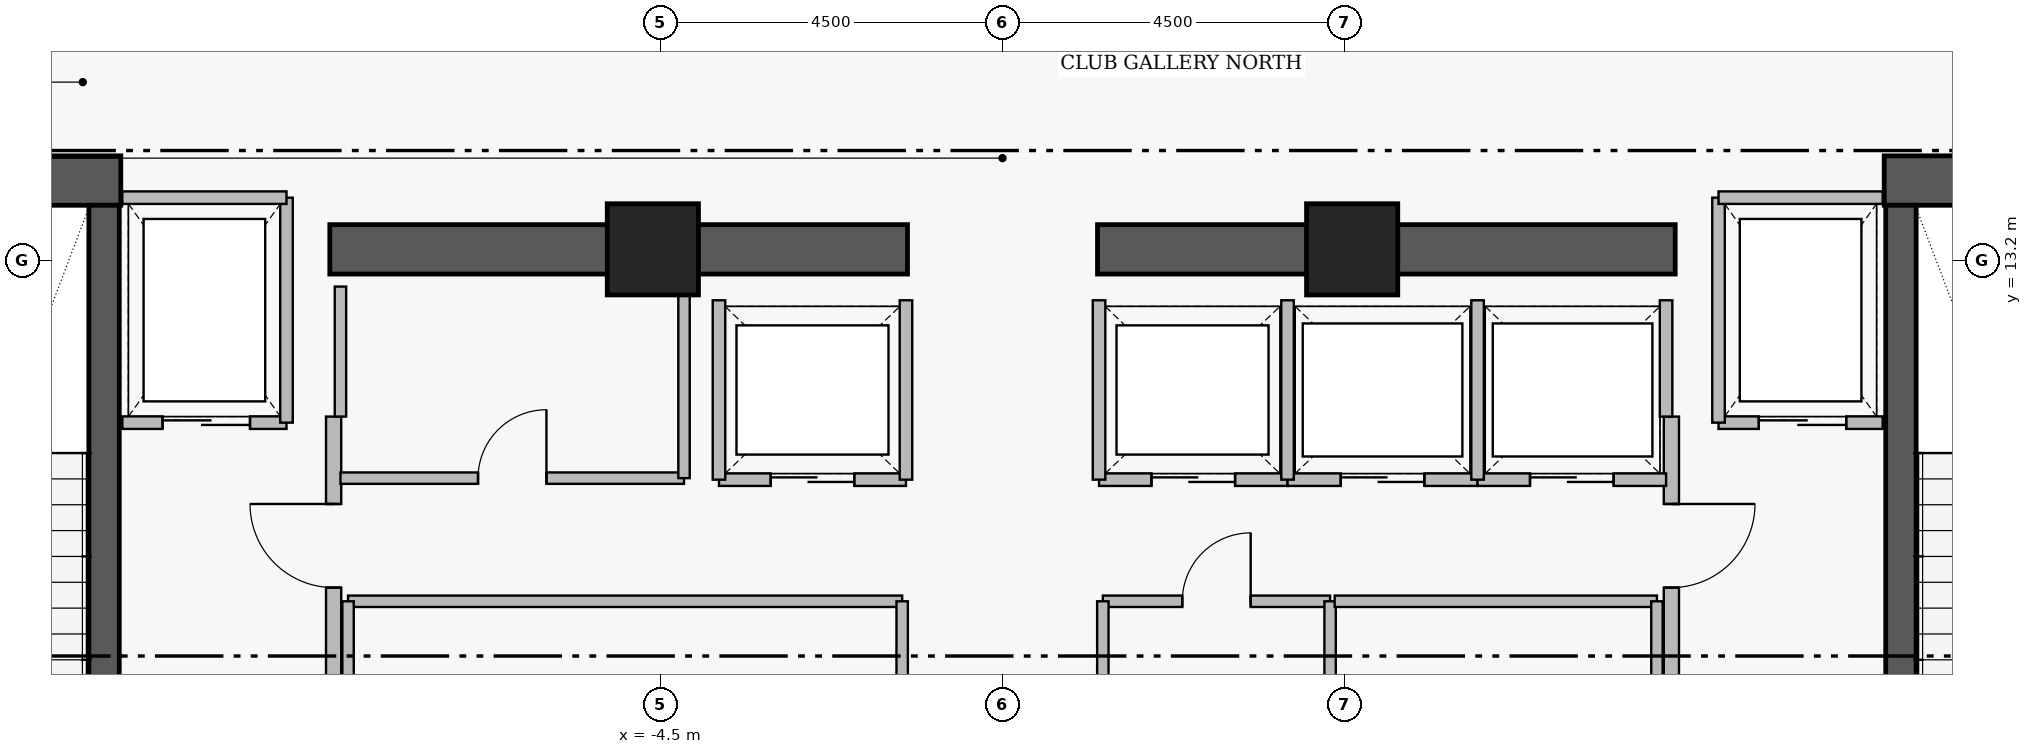
"""IFC4 building model, lengths in metres.
Left out: names, types, materials, properties, quantities, classifications, styles, units other than length and angle.
Written with IfcOpenShell. Run it as: python <this file> out.ifc"""

import sys

from ifc_helpers import new_model, si_unit, direction, frame, frame_2d, origin, origin_2d, place, context, subcontext, project, spatial, rectangle, extrude, element, fill, save


model = new_model("IFC4")
c1 = context("Model", 3, precision=1e-05, world=origin(), true_north=direction((0.0, 1.0)))
c2 = subcontext(c1, "Body", "Model", "MODEL_VIEW")
j1 = project(units=[si_unit("LENGTHUNIT", "METRE"), si_unit("PLANEANGLEUNIT", "RADIAN")], contexts=[c1])
p1 = place(None, origin())
s1 = spatial("IfcSite", under=j1, at=p1, CompositionType="ELEMENT")
p2 = place(p1, origin())
s2 = spatial("IfcBuilding", under=s1, at=p2, CompositionType="ELEMENT")
p3 = place(p2, frame((0.0, 0.0, 168.2)))
s3 = spatial("IfcBuildingStorey", under=s2, at=p3, CompositionType="ELEMENT", Elevation=168.2)
for number, where, z_axis, x_axis in (
    (1, (-16.06, 14.255, 0.0), (0.0, 0.0, 1.0), (1.0, 0.0, 0.0)),
    (2, (11.6, 14.255, 0.0), (0.0, 0.0, 1.0), (1.0, 0.0, 0.0)),
):
    element("IfcWall", number, at=place(p3, frame(where, z_axis=z_axis, x_axis=x_axis)), inside=s3, PredefinedType="SHEAR", context=c2, shape_type="SweptSolid", body=[
        extrude(rectangle(XDim=4.46, YDim=0.65, at=frame_2d((2.23, 0.0))), origin(), (0.0, 0.0, 1.0), 4.41),
    ])
for number, where, z_axis, x_axis in (
    (3, (-8.85, 13.35, 0.0), (0.0, 0.0, 1.0), (1.0, 0.0, 0.0)),
    (4, (1.25, 13.35, 0.0), (0.0, 0.0, 1.0), (1.0, 0.0, 0.0)),
):
    element("IfcWall", number, at=place(p3, frame(where, z_axis=z_axis, x_axis=x_axis)), inside=s3, PredefinedType="SHEAR", context=c2, shape_type="SweptSolid", body=[
        extrude(rectangle(XDim=7.6, YDim=0.65, at=frame_2d((3.8, 0.0))), origin(), (0.0, 0.0, 1.0), 4.38),
    ])
p4 = place(p3, frame((-11.82, 4.97, 0.0), z_axis=(0.0, 0.0, 1.0), x_axis=(0.0, 1.0, 0.0)))
e5 = element("IfcWall", 5, at=p4, inside=s3, PredefinedType="SHEAR", context=c2, shape_type="SweptSolid", body=[
    extrude(rectangle(XDim=8.96, YDim=0.4, at=frame_2d((4.48, 0.0))), origin(), (0.0, 0.0, 1.0), 4.41),
])
p5 = place(p4, frame((0.31, 0.0, 0.0)))
e6 = element("IfcOpeningElement", 6, at=p5, cuts=e5, PredefinedType="OPENING", context=c2, shape_type="SweptSolid", body=[
    extrude(rectangle(XDim=1.12, YDim=2.22, at=frame_2d((0.56, 1.11))), frame((0.0, 0.21, 0.0), z_axis=(0.0, -1.0, 0.0), x_axis=(1.0, 0.0, 0.0)), (0.0, 0.0, 1.0), 0.42),
])
p6 = place(p3, frame((11.82, 13.93, 0.0), z_axis=(0.0, 0.0, 1.0), x_axis=(0.0, -1.0, 0.0)))
e7 = element("IfcWall", 7, at=p6, inside=s3, PredefinedType="SHEAR", context=c2, shape_type="SweptSolid", body=[
    extrude(rectangle(XDim=8.96, YDim=0.4, at=frame_2d((4.48, 0.0))), origin(), (0.0, 0.0, 1.0), 4.41),
])
p7 = place(p6, frame((7.53, 0.0, 0.0)))
e8 = element("IfcOpeningElement", 8, at=p7, cuts=e7, PredefinedType="OPENING", context=c2, shape_type="SweptSolid", body=[
    extrude(rectangle(XDim=1.12, YDim=2.22, at=frame_2d((0.56, 1.11))), frame((0.0, 0.21, 0.0), z_axis=(0.0, -1.0, 0.0), x_axis=(1.0, 0.0, 0.0)), (0.0, 0.0, 1.0), 0.42),
])
for number, where, z_axis, x_axis in (
    (9, (-4.6, 13.35, 0.0), (0.0, 0.0, 1.0), (1.0, 0.0, 0.0)),
    (10, (4.6, 13.35, 0.0), (0.0, 0.0, 1.0), (1.0, 0.0, 0.0)),
):
    element("IfcColumn", number, at=place(p3, frame(where, z_axis=z_axis, x_axis=x_axis)), inside=s3, PredefinedType="COLUMN", context=c2, shape_type="SweptSolid", body=[
        extrude(rectangle(XDim=1.2, YDim=1.2, at=origin_2d()), origin(), (0.0, 0.0, 1.0), 4.6),
    ])
p8 = place(p3, frame((-8.8, 5.05, 0.0), z_axis=(0.0, 0.0, 1.0), x_axis=(0.0, 1.0, 0.0)))
e11 = element("IfcWall", 11, at=p8, inside=s3, PredefinedType="PARTITIONING", context=c2, shape_type="SweptSolid", body=[
    extrude(rectangle(XDim=6.1, YDim=0.2, at=frame_2d((3.05, 0.0))), origin(), (0.0, 0.0, 1.0), 4.38),
])
p9 = place(p8, frame((0.25, 0.0, 0.0)))
e12 = element("IfcOpeningElement", 12, at=p9, cuts=e11, PredefinedType="OPENING", context=c2, shape_type="SweptSolid", body=[
    extrude(rectangle(XDim=1.1, YDim=2.2, at=frame_2d((0.55, 1.1))), frame((0.0, 0.11, 0.0), z_axis=(0.0, -1.0, 0.0), x_axis=(1.0, 0.0, 0.0)), (0.0, 0.0, 1.0), 0.22),
])
p10 = place(p8, frame((3.85, 0.0, 0.0)))
e13 = element("IfcOpeningElement", 13, at=p10, cuts=e11, PredefinedType="OPENING", context=c2, shape_type="SweptSolid", body=[
    extrude(rectangle(XDim=1.1, YDim=2.2, at=frame_2d((0.55, 1.1))), frame((0.0, 0.11, 0.0), z_axis=(0.0, -1.0, 0.0), x_axis=(1.0, 0.0, 0.0)), (0.0, 0.0, 1.0), 0.22),
])
p11 = place(p3, frame((8.8, 11.15, 0.0), z_axis=(0.0, 0.0, 1.0), x_axis=(0.0, -1.0, 0.0)))
e14 = element("IfcWall", 14, at=p11, inside=s3, PredefinedType="PARTITIONING", context=c2, shape_type="SweptSolid", body=[
    extrude(rectangle(XDim=6.1, YDim=0.2, at=frame_2d((3.05, 0.0))), origin(), (0.0, 0.0, 1.0), 4.38),
])
p12 = place(p11, frame((1.15, 0.0, 0.0)))
e15 = element("IfcOpeningElement", 15, at=p12, cuts=e14, PredefinedType="OPENING", context=c2, shape_type="SweptSolid", body=[
    extrude(rectangle(XDim=1.1, YDim=2.2, at=frame_2d((0.55, 1.1))), frame((0.0, 0.11, 0.0), z_axis=(0.0, -1.0, 0.0), x_axis=(1.0, 0.0, 0.0)), (0.0, 0.0, 1.0), 0.22),
])
p13 = place(p11, frame((4.75, 0.0, 0.0)))
e16 = element("IfcOpeningElement", 16, at=p13, cuts=e14, PredefinedType="OPENING", context=c2, shape_type="SweptSolid", body=[
    extrude(rectangle(XDim=1.1, YDim=2.2, at=frame_2d((0.55, 1.1))), frame((0.0, 0.11, 0.0), z_axis=(0.0, -1.0, 0.0), x_axis=(1.0, 0.0, 0.0)), (0.0, 0.0, 1.0), 0.22),
])
p14 = place(p3, frame((-11.58, 11.07, 0.0), z_axis=(0.0, 0.0, 1.0), x_axis=(1.0, 0.0, 0.0)))
e17 = element("IfcWall", 17, at=p14, inside=s3, PredefinedType="PARTITIONING", context=c2, shape_type="SweptSolid", body=[
    extrude(rectangle(XDim=2.16, YDim=0.165, at=frame_2d((1.08, 0.0))), origin(), (0.0, 0.0, 1.0), 4.38),
])
p15 = place(p14, frame((0.53, 0.0, 0.0)))
e18 = element("IfcOpeningElement", 18, at=p15, cuts=e17, PredefinedType="OPENING", context=c2, shape_type="SweptSolid", body=[
    extrude(rectangle(XDim=1.15, YDim=2.25, at=frame_2d((0.575, 1.125))), frame((0.0, 0.093, 0.0), z_axis=(0.0, -1.0, 0.0), x_axis=(1.0, 0.0, 0.0)), (0.0, 0.0, 1.0), 0.185),
])
p16 = place(p3, frame((9.42, 11.07, 0.0), z_axis=(0.0, 0.0, 1.0), x_axis=(1.0, 0.0, 0.0)))
e19 = element("IfcWall", 19, at=p16, inside=s3, PredefinedType="PARTITIONING", context=c2, shape_type="SweptSolid", body=[
    extrude(rectangle(XDim=2.16, YDim=0.165, at=frame_2d((1.08, 0.0))), origin(), (0.0, 0.0, 1.0), 4.38),
])
p17 = place(p16, frame((0.53, 0.0, 0.0)))
e20 = element("IfcOpeningElement", 20, at=p17, cuts=e19, PredefinedType="OPENING", context=c2, shape_type="SweptSolid", body=[
    extrude(rectangle(XDim=1.15, YDim=2.25, at=frame_2d((0.575, 1.125))), frame((0.0, 0.093, 0.0), z_axis=(0.0, -1.0, 0.0), x_axis=(1.0, 0.0, 0.0)), (0.0, 0.0, 1.0), 0.185),
])
p18 = place(p3, frame((-3.73, 10.32, 0.0), z_axis=(0.0, 0.0, 1.0), x_axis=(1.0, 0.0, 0.0)))
e21 = element("IfcWall", 21, at=p18, inside=s3, PredefinedType="PARTITIONING", context=c2, shape_type="SweptSolid", body=[
    extrude(rectangle(XDim=2.46, YDim=0.165, at=frame_2d((1.23, 0.0))), origin(), (0.0, 0.0, 1.0), 4.38),
])
p19 = place(p18, frame((0.68, 0.0, 0.0)))
e22 = element("IfcOpeningElement", 22, at=p19, cuts=e21, PredefinedType="OPENING", context=c2, shape_type="SweptSolid", body=[
    extrude(rectangle(XDim=1.1, YDim=2.25, at=frame_2d((0.55, 1.125))), frame((0.0, 0.093, 0.0), z_axis=(0.0, -1.0, 0.0), x_axis=(1.0, 0.0, 0.0)), (0.0, 0.0, 1.0), 0.185),
])
p20 = place(p3, frame((1.27, 10.32, 0.0), z_axis=(0.0, 0.0, 1.0), x_axis=(1.0, 0.0, 0.0)))
e23 = element("IfcWall", 23, at=p20, inside=s3, PredefinedType="PARTITIONING", context=c2, shape_type="SweptSolid", body=[
    extrude(rectangle(XDim=2.48, YDim=0.165, at=frame_2d((1.24, 0.0))), origin(), (0.0, 0.0, 1.0), 4.38),
])
p21 = place(p20, frame((0.69, 0.0, 0.0)))
e24 = element("IfcOpeningElement", 24, at=p21, cuts=e23, PredefinedType="OPENING", context=c2, shape_type="SweptSolid", body=[
    extrude(rectangle(XDim=1.1, YDim=2.25, at=frame_2d((0.55, 1.125))), frame((0.0, 0.093, 0.0), z_axis=(0.0, -1.0, 0.0), x_axis=(1.0, 0.0, 0.0)), (0.0, 0.0, 1.0), 0.185),
])
p22 = place(p3, frame((3.75, 10.32, 0.0), z_axis=(0.0, 0.0, 1.0), x_axis=(1.0, 0.0, 0.0)))
e25 = element("IfcWall", 25, at=p22, inside=s3, PredefinedType="PARTITIONING", context=c2, shape_type="SweptSolid", body=[
    extrude(rectangle(XDim=2.5, YDim=0.165, at=frame_2d((1.25, 0.0))), origin(), (0.0, 0.0, 1.0), 4.38),
])
p23 = place(p22, frame((0.7, 0.0, 0.0)))
e26 = element("IfcOpeningElement", 26, at=p23, cuts=e25, PredefinedType="OPENING", context=c2, shape_type="SweptSolid", body=[
    extrude(rectangle(XDim=1.1, YDim=2.25, at=frame_2d((0.55, 1.125))), frame((0.0, 0.093, 0.0), z_axis=(0.0, -1.0, 0.0), x_axis=(1.0, 0.0, 0.0)), (0.0, 0.0, 1.0), 0.185),
])
p24 = place(p3, frame((6.25, 10.32, 0.0), z_axis=(0.0, 0.0, 1.0), x_axis=(1.0, 0.0, 0.0)))
e27 = element("IfcWall", 27, at=p24, inside=s3, PredefinedType="PARTITIONING", context=c2, shape_type="SweptSolid", body=[
    extrude(rectangle(XDim=2.48, YDim=0.165, at=frame_2d((1.24, 0.0))), origin(), (0.0, 0.0, 1.0), 4.38),
])
p25 = place(p24, frame((0.69, 0.0, 0.0)))
e28 = element("IfcOpeningElement", 28, at=p25, cuts=e27, PredefinedType="OPENING", context=c2, shape_type="SweptSolid", body=[
    extrude(rectangle(XDim=1.1, YDim=2.25, at=frame_2d((0.55, 1.125))), frame((0.0, 0.093, 0.0), z_axis=(0.0, -1.0, 0.0), x_axis=(1.0, 0.0, 0.0)), (0.0, 0.0, 1.0), 0.185),
])
p26 = place(p3, frame((-8.71, 10.34, 0.0), z_axis=(0.0, 0.0, 1.0), x_axis=(1.0, 0.0, 0.0)))
e29 = element("IfcWall", 29, at=p26, inside=s3, PredefinedType="PARTITIONING", context=c2, shape_type="SweptSolid", body=[
    extrude(rectangle(XDim=4.52, YDim=0.15, at=frame_2d((2.26, 0.0))), origin(), (0.0, 0.0, 1.0), 4.38),
])
p27 = place(p26, frame((1.81, 0.0, 0.0)))
e30 = element("IfcOpeningElement", 30, at=p27, cuts=e29, PredefinedType="OPENING", context=c2, shape_type="SweptSolid", body=[
    extrude(rectangle(XDim=0.9, YDim=2.15, at=frame_2d((0.45, 1.075))), frame((0.0, 0.085, 0.0), z_axis=(0.0, -1.0, 0.0), x_axis=(1.0, 0.0, 0.0)), (0.0, 0.0, 1.0), 0.17),
])
p28 = place(p3, frame((1.32, 8.72, 0.0), z_axis=(0.0, 0.0, 1.0), x_axis=(1.0, 0.0, 0.0)))
e31 = element("IfcWall", 31, at=p28, inside=s3, PredefinedType="PARTITIONING", context=c2, shape_type="SweptSolid", body=[
    extrude(rectangle(XDim=2.99, YDim=0.15, at=frame_2d((1.495, 0.0))), origin(), (0.0, 0.0, 1.0), 4.38),
])
p29 = place(p28, frame((1.045, 0.0, 0.0)))
e32 = element("IfcOpeningElement", 32, at=p29, cuts=e31, PredefinedType="OPENING", context=c2, shape_type="SweptSolid", body=[
    extrude(rectangle(XDim=0.9, YDim=2.15, at=frame_2d((0.45, 1.075))), frame((0.0, 0.085, 0.0), z_axis=(0.0, -1.0, 0.0), x_axis=(1.0, 0.0, 0.0)), (0.0, 0.0, 1.0), 0.17),
])
p30 = place(p3, frame((-9.42, 11.07, 0.0), z_axis=(0.0, 0.0, 1.0), x_axis=(0.0, 1.0, 0.0)))
e33 = element("IfcWall", 33, at=p30, inside=s3, PredefinedType="PARTITIONING", context=c2, shape_type="SweptSolid", body=[
    extrude(rectangle(XDim=2.96, YDim=0.165, at=frame_2d((1.48, 0.0))), origin(), (0.0, 0.0, 1.0), 4.38),
])
p31 = place(p3, frame((-11.58, 14.03, 0.0), z_axis=(0.0, 0.0, 1.0), x_axis=(1.0, 0.0, 0.0)))
e34 = element("IfcWall", 34, at=p31, inside=s3, PredefinedType="PARTITIONING", context=c2, shape_type="SweptSolid", body=[
    extrude(rectangle(XDim=2.16, YDim=0.165, at=frame_2d((1.08, 0.0))), origin(), (0.0, 0.0, 1.0), 4.38),
])
p32 = place(p3, frame((9.42, 11.07, 0.0), z_axis=(0.0, 0.0, 1.0), x_axis=(0.0, 1.0, 0.0)))
e35 = element("IfcWall", 35, at=p32, inside=s3, PredefinedType="PARTITIONING", context=c2, shape_type="SweptSolid", body=[
    extrude(rectangle(XDim=2.96, YDim=0.165, at=frame_2d((1.48, 0.0))), origin(), (0.0, 0.0, 1.0), 4.38),
])
p33 = place(p3, frame((9.42, 14.03, 0.0), z_axis=(0.0, 0.0, 1.0), x_axis=(1.0, 0.0, 0.0)))
e36 = element("IfcWall", 36, at=p33, inside=s3, PredefinedType="PARTITIONING", context=c2, shape_type="SweptSolid", body=[
    extrude(rectangle(XDim=2.16, YDim=0.165, at=frame_2d((1.08, 0.0))), origin(), (0.0, 0.0, 1.0), 4.38),
])
for number, where, z_axis, x_axis in (
    (37, (-3.73, 10.32, 0.0), (0.0, 0.0, 1.0), (0.0, 1.0, 0.0)),
    (38, (-1.27, 10.32, 0.0), (0.0, 0.0, 1.0), (0.0, 1.0, 0.0)),
    (39, (1.27, 10.32, 0.0), (0.0, 0.0, 1.0), (0.0, 1.0, 0.0)),
    (40, (3.75, 10.32, 0.0), (0.0, 0.0, 1.0), (0.0, 1.0, 0.0)),
    (41, (6.25, 10.32, 0.0), (0.0, 0.0, 1.0), (0.0, 1.0, 0.0)),
):
    element("IfcWall", number, at=place(p3, frame(where, z_axis=z_axis, x_axis=x_axis)), inside=s3, PredefinedType="PARTITIONING", context=c2, shape_type="SweptSolid", body=[
        extrude(rectangle(XDim=2.36, YDim=0.165, at=frame_2d((1.18, 0.0))), origin(), (0.0, 0.0, 1.0), 4.38),
    ])
p34 = place(p3, frame((8.73, 11.15, 0.0), z_axis=(0.0, 0.0, 1.0), x_axis=(0.0, 1.0, 0.0)))
e42 = element("IfcWall", 42, at=p34, inside=s3, PredefinedType="PARTITIONING", context=c2, shape_type="SweptSolid", body=[
    extrude(rectangle(XDim=1.53, YDim=0.165, at=frame_2d((0.765, 0.0))), origin(), (0.0, 0.0, 1.0), 4.38),
])
p35 = place(p3, frame((-8.71, 11.15, 0.0), z_axis=(0.0, 0.0, 1.0), x_axis=(0.0, 1.0, 0.0)))
e43 = element("IfcWall", 43, at=p35, inside=s3, PredefinedType="PARTITIONING", context=c2, shape_type="SweptSolid", body=[
    extrude(rectangle(XDim=1.71, YDim=0.15, at=frame_2d((0.855, 0.0))), origin(), (0.0, 0.0, 1.0), 4.38),
])
p36 = place(p3, frame((-4.19, 10.34, 0.0), z_axis=(0.0, 0.0, 1.0), x_axis=(0.0, 1.0, 0.0)))
e44 = element("IfcWall", 44, at=p36, inside=s3, PredefinedType="PARTITIONING", context=c2, shape_type="SweptSolid", body=[
    extrude(rectangle(XDim=2.52, YDim=0.15, at=frame_2d((1.26, 0.0))), origin(), (0.0, 0.0, 1.0), 4.38),
])
p37 = place(p3, frame((-8.61, 8.72, 0.0), z_axis=(0.0, 0.0, 1.0), x_axis=(1.0, 0.0, 0.0)))
e45 = element("IfcWall", 45, at=p37, inside=s3, PredefinedType="PARTITIONING", context=c2, shape_type="SweptSolid", body=[
    extrude(rectangle(XDim=7.29, YDim=0.15, at=frame_2d((3.645, 0.0))), origin(), (0.0, 0.0, 1.0), 4.38),
])
for number, where, z_axis, x_axis in (
    (46, (-8.61, 6.48, 0.0), (0.0, 0.0, 1.0), (0.0, 1.0, 0.0)),
    (47, (-1.32, 6.48, 0.0), (0.0, 0.0, 1.0), (0.0, 1.0, 0.0)),
    (48, (1.32, 6.48, 0.0), (0.0, 0.0, 1.0), (0.0, 1.0, 0.0)),
    (49, (4.31, 6.48, 0.0), (0.0, 0.0, 1.0), (0.0, 1.0, 0.0)),
):
    element("IfcWall", number, at=place(p3, frame(where, z_axis=z_axis, x_axis=x_axis)), inside=s3, PredefinedType="PARTITIONING", context=c2, shape_type="SweptSolid", body=[
        extrude(rectangle(XDim=2.24, YDim=0.15, at=frame_2d((1.12, 0.0))), origin(), (0.0, 0.0, 1.0), 4.38),
    ])
p38 = place(p3, frame((4.37, 8.72, 0.0), z_axis=(0.0, 0.0, 1.0), x_axis=(1.0, 0.0, 0.0)))
e50 = element("IfcWall", 50, at=p38, inside=s3, PredefinedType="PARTITIONING", context=c2, shape_type="SweptSolid", body=[
    extrude(rectangle(XDim=4.24, YDim=0.15, at=frame_2d((2.12, 0.0))), origin(), (0.0, 0.0, 1.0), 4.38),
])
p39 = place(p3, frame((8.61, 6.48, 0.0), z_axis=(0.0, 0.0, 1.0), x_axis=(0.0, 1.0, 0.0)))
e51 = element("IfcWall", 51, at=p39, inside=s3, PredefinedType="PARTITIONING", context=c2, shape_type="SweptSolid", body=[
    extrude(rectangle(XDim=2.24, YDim=0.15, at=frame_2d((1.12, 0.0))), origin(), (0.0, 0.0, 1.0), 4.38),
])
p40 = place(p10, origin())
e52 = element("IfcDoor", 52, at=p40, inside=s3, OperationType="SINGLE_SWING_RIGHT", PredefinedType="DOOR", context=c2, shape_type="SweptSolid", body=[
    extrude(rectangle(XDim=1.1, YDim=2.2, at=frame_2d((0.55, 1.1))), frame((0.0, 0.025, 0.0), z_axis=(0.0, -1.0, 0.0), x_axis=(1.0, 0.0, 0.0)), (0.0, 0.0, 1.0), 0.05),
])
fill(e13, e52)
p41 = place(p12, origin())
e53 = element("IfcDoor", 53, at=p41, inside=s3, OperationType="SINGLE_SWING_LEFT", PredefinedType="DOOR", context=c2, shape_type="SweptSolid", body=[
    extrude(rectangle(XDim=1.1, YDim=2.2, at=frame_2d((0.55, 1.1))), frame((0.0, 0.025, 0.0), z_axis=(0.0, -1.0, 0.0), x_axis=(1.0, 0.0, 0.0)), (0.0, 0.0, 1.0), 0.05),
])
fill(e15, e53)
p42 = place(p15, origin())
e54 = element("IfcDoor", 54, at=p42, inside=s3, OperationType="SLIDING_TO_LEFT", PredefinedType="DOOR", context=c2, shape_type="SweptSolid", body=[
    extrude(rectangle(XDim=1.15, YDim=2.25, at=frame_2d((0.575, 1.125))), frame((0.0, 0.025, 0.0), z_axis=(0.0, -1.0, 0.0), x_axis=(1.0, 0.0, 0.0)), (0.0, 0.0, 1.0), 0.05),
])
fill(e18, e54)
p43 = place(p17, origin())
e55 = element("IfcDoor", 55, at=p43, inside=s3, OperationType="SLIDING_TO_LEFT", PredefinedType="DOOR", context=c2, shape_type="SweptSolid", body=[
    extrude(rectangle(XDim=1.15, YDim=2.25, at=frame_2d((0.575, 1.125))), frame((0.0, 0.025, 0.0), z_axis=(0.0, -1.0, 0.0), x_axis=(1.0, 0.0, 0.0)), (0.0, 0.0, 1.0), 0.05),
])
fill(e20, e55)
p44 = place(p19, origin())
e56 = element("IfcDoor", 56, at=p44, inside=s3, OperationType="SLIDING_TO_LEFT", PredefinedType="DOOR", context=c2, shape_type="SweptSolid", body=[
    extrude(rectangle(XDim=1.1, YDim=2.25, at=frame_2d((0.55, 1.125))), frame((0.0, 0.025, 0.0), z_axis=(0.0, -1.0, 0.0), x_axis=(1.0, 0.0, 0.0)), (0.0, 0.0, 1.0), 0.05),
])
fill(e22, e56)
p45 = place(p21, origin())
e57 = element("IfcDoor", 57, at=p45, inside=s3, OperationType="SLIDING_TO_LEFT", PredefinedType="DOOR", context=c2, shape_type="SweptSolid", body=[
    extrude(rectangle(XDim=1.1, YDim=2.25, at=frame_2d((0.55, 1.125))), frame((0.0, 0.025, 0.0), z_axis=(0.0, -1.0, 0.0), x_axis=(1.0, 0.0, 0.0)), (0.0, 0.0, 1.0), 0.05),
])
fill(e24, e57)
p46 = place(p23, origin())
e58 = element("IfcDoor", 58, at=p46, inside=s3, OperationType="SLIDING_TO_LEFT", PredefinedType="DOOR", context=c2, shape_type="SweptSolid", body=[
    extrude(rectangle(XDim=1.1, YDim=2.25, at=frame_2d((0.55, 1.125))), frame((0.0, 0.025, 0.0), z_axis=(0.0, -1.0, 0.0), x_axis=(1.0, 0.0, 0.0)), (0.0, 0.0, 1.0), 0.05),
])
fill(e26, e58)
p47 = place(p25, origin())
e59 = element("IfcDoor", 59, at=p47, inside=s3, OperationType="SLIDING_TO_LEFT", PredefinedType="DOOR", context=c2, shape_type="SweptSolid", body=[
    extrude(rectangle(XDim=1.1, YDim=2.25, at=frame_2d((0.55, 1.125))), frame((0.0, 0.025, 0.0), z_axis=(0.0, -1.0, 0.0), x_axis=(1.0, 0.0, 0.0)), (0.0, 0.0, 1.0), 0.05),
])
fill(e28, e59)
p48 = place(p27, origin())
e60 = element("IfcDoor", 60, at=p48, inside=s3, OperationType="SINGLE_SWING_RIGHT", PredefinedType="DOOR", context=c2, shape_type="SweptSolid", body=[
    extrude(rectangle(XDim=0.9, YDim=2.15, at=frame_2d((0.45, 1.075))), frame((0.0, 0.025, 0.0), z_axis=(0.0, -1.0, 0.0), x_axis=(1.0, 0.0, 0.0)), (0.0, 0.0, 1.0), 0.05),
])
fill(e30, e60)
p49 = place(p29, origin())
e61 = element("IfcDoor", 61, at=p49, inside=s3, OperationType="SINGLE_SWING_RIGHT", PredefinedType="DOOR", context=c2, shape_type="SweptSolid", body=[
    extrude(rectangle(XDim=0.9, YDim=2.15, at=frame_2d((0.45, 1.075))), frame((0.0, 0.025, 0.0), z_axis=(0.0, -1.0, 0.0), x_axis=(1.0, 0.0, 0.0)), (0.0, 0.0, 1.0), 0.05),
])
fill(e32, e61)
save(model, sys.argv[1])
